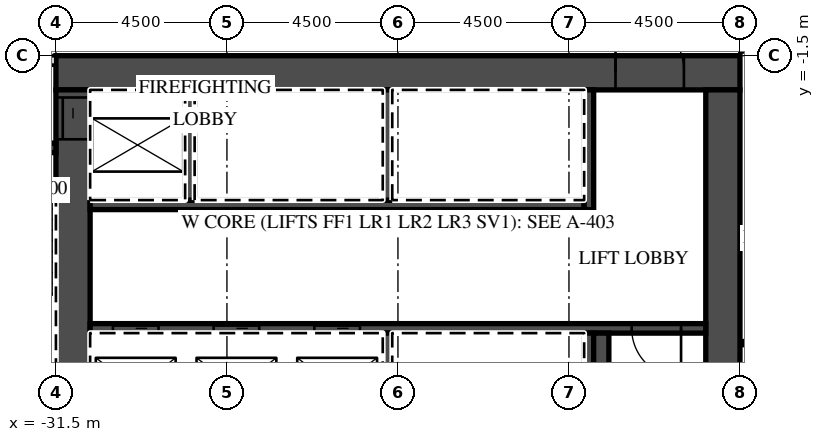
"""IFC4 building model, lengths in metres.
Left out: names, types, materials, properties, quantities, classifications, styles, units other than length and angle.
Written with IfcOpenShell. Run it as: python <this file> out.ifc"""

import sys

from ifc_helpers import new_model, si_unit, direction, frame, frame_2d, origin, place, context, subcontext, project, spatial, rectangle, extrude, element, fill, save


model = new_model("IFC4")
c1 = context("Model", 3, precision=1e-05, world=origin(), true_north=direction((0.0, 1.0)))
c2 = subcontext(c1, "Body", "Model", "MODEL_VIEW")
j1 = project(units=[si_unit("LENGTHUNIT", "METRE"), si_unit("PLANEANGLEUNIT", "RADIAN")], contexts=[c1])
p1 = place(None, origin())
s1 = spatial("IfcSite", under=j1, at=p1, CompositionType="ELEMENT")
p2 = place(p1, origin())
s2 = spatial("IfcBuilding", under=s1, at=p2, CompositionType="ELEMENT")
p3 = place(p2, frame((0.0, 0.0, 79.8)))
s3 = spatial("IfcBuildingStorey", under=s2, at=p3, CompositionType="ELEMENT", Elevation=79.8)
p4 = place(p3, frame((-13.5, -1.3, 0.0), z_axis=(0.0, 0.0, 1.0), x_axis=(1.0, 0.0, 0.0)))
e1 = element("IfcWall", 1, at=p4, inside=s3, PredefinedType="PARTITIONING", context=c2, shape_type="SweptSolid", body=[
    extrude(rectangle(XDim=58.05, YDim=0.2, at=frame_2d((29.025, 0.0))), origin(), (0.0, 0.0, 1.0), 3.02),
])
p5 = place(p4, frame((2.925, 0.0, 0.0)))
e2 = element("IfcOpeningElement", 2, at=p5, cuts=e1, PredefinedType="OPENING", context=c2, shape_type="SweptSolid", body=[
    extrude(rectangle(XDim=1.0, YDim=2.1, at=frame_2d((0.5, 1.05))), frame((0.0, 0.11, 0.0), z_axis=(0.0, -1.0, 0.0), x_axis=(1.0, 0.0, 0.0)), (0.0, 0.0, 1.0), 0.22),
])
p6 = place(p4, frame((7.45, 0.0, 0.0)))
e3 = element("IfcOpeningElement", 3, at=p6, cuts=e1, PredefinedType="OPENING", context=c2, shape_type="SweptSolid", body=[
    extrude(rectangle(XDim=1.0, YDim=2.1, at=frame_2d((0.5, 1.05))), frame((0.0, 0.11, 0.0), z_axis=(0.0, -1.0, 0.0), x_axis=(1.0, 0.0, 0.0)), (0.0, 0.0, 1.0), 0.22),
])
p7 = place(p4, frame((11.925, 0.0, 0.0)))
e4 = element("IfcOpeningElement", 4, at=p7, cuts=e1, PredefinedType="OPENING", context=c2, shape_type="SweptSolid", body=[
    extrude(rectangle(XDim=1.0, YDim=2.1, at=frame_2d((0.5, 1.05))), frame((0.0, 0.11, 0.0), z_axis=(0.0, -1.0, 0.0), x_axis=(1.0, 0.0, 0.0)), (0.0, 0.0, 1.0), 0.22),
])
p8 = place(p4, frame((15.938, 0.0, 0.0)))
e5 = element("IfcOpeningElement", 5, at=p8, cuts=e1, PredefinedType="OPENING", context=c2, shape_type="SweptSolid", body=[
    extrude(rectangle(XDim=1.2, YDim=2.1, at=frame_2d((0.6, 1.05))), frame((0.0, 0.11, 0.0), z_axis=(0.0, -1.0, 0.0), x_axis=(1.0, 0.0, 0.0)), (0.0, 0.0, 1.0), 0.22),
])
p9 = place(p4, frame((25.45, 0.0, 0.0)))
e6 = element("IfcOpeningElement", 6, at=p9, cuts=e1, PredefinedType="OPENING", context=c2, shape_type="SweptSolid", body=[
    extrude(rectangle(XDim=1.0, YDim=2.1, at=frame_2d((0.5, 1.05))), frame((0.0, 0.11, 0.0), z_axis=(0.0, -1.0, 0.0), x_axis=(1.0, 0.0, 0.0)), (0.0, 0.0, 1.0), 0.22),
])
p10 = place(p4, frame((29.925, 0.0, 0.0)))
e7 = element("IfcOpeningElement", 7, at=p10, cuts=e1, PredefinedType="OPENING", context=c2, shape_type="SweptSolid", body=[
    extrude(rectangle(XDim=1.0, YDim=2.1, at=frame_2d((0.5, 1.05))), frame((0.0, 0.11, 0.0), z_axis=(0.0, -1.0, 0.0), x_axis=(1.0, 0.0, 0.0)), (0.0, 0.0, 1.0), 0.22),
])
p11 = place(p4, frame((36.862, 0.0, 0.0)))
e8 = element("IfcOpeningElement", 8, at=p11, cuts=e1, PredefinedType="OPENING", context=c2, shape_type="SweptSolid", body=[
    extrude(rectangle(XDim=1.2, YDim=2.1, at=frame_2d((0.6, 1.05))), frame((0.0, 0.11, 0.0), z_axis=(0.0, -1.0, 0.0), x_axis=(1.0, 0.0, 0.0)), (0.0, 0.0, 1.0), 0.22),
])
p12 = place(p4, frame((41.075, 0.0, 0.0)))
e9 = element("IfcOpeningElement", 9, at=p12, cuts=e1, PredefinedType="OPENING", context=c2, shape_type="SweptSolid", body=[
    extrude(rectangle(XDim=1.0, YDim=2.1, at=frame_2d((0.5, 1.05))), frame((0.0, 0.11, 0.0), z_axis=(0.0, -1.0, 0.0), x_axis=(1.0, 0.0, 0.0)), (0.0, 0.0, 1.0), 0.22),
])
p13 = place(p4, frame((45.55, 0.0, 0.0)))
e10 = element("IfcOpeningElement", 10, at=p13, cuts=e1, PredefinedType="OPENING", context=c2, shape_type="SweptSolid", body=[
    extrude(rectangle(XDim=1.0, YDim=2.1, at=frame_2d((0.5, 1.05))), frame((0.0, 0.11, 0.0), z_axis=(0.0, -1.0, 0.0), x_axis=(1.0, 0.0, 0.0)), (0.0, 0.0, 1.0), 0.22),
])
p14 = place(p4, frame((52.425, 0.0, 0.0)))
e11 = element("IfcOpeningElement", 11, at=p14, cuts=e1, PredefinedType="OPENING", context=c2, shape_type="SweptSolid", body=[
    extrude(rectangle(XDim=1.0, YDim=2.1, at=frame_2d((0.5, 1.05))), frame((0.0, 0.11, 0.0), z_axis=(0.0, -1.0, 0.0), x_axis=(1.0, 0.0, 0.0)), (0.0, 0.0, 1.0), 0.22),
])
p15 = place(p4, frame((56.525, 0.0, 0.0)))
e12 = element("IfcOpeningElement", 12, at=p15, cuts=e1, PredefinedType="OPENING", context=c2, shape_type="SweptSolid", body=[
    extrude(rectangle(XDim=1.0, YDim=2.1, at=frame_2d((0.5, 1.05))), frame((0.0, 0.11, 0.0), z_axis=(0.0, -1.0, 0.0), x_axis=(1.0, 0.0, 0.0)), (0.0, 0.0, 1.0), 0.22),
])
p16 = place(p3, frame((-31.5, -1.95, 0.0), z_axis=(0.0, 0.0, 1.0), x_axis=(1.0, 0.0, 0.0)))
e13 = element("IfcWall", 13, at=p16, inside=s3, PredefinedType="SHEAR", context=c2, shape_type="SweptSolid", body=[
    extrude(rectangle(XDim=18.0, YDim=0.9, at=frame_2d((9.0, 0.0))), origin(), (0.0, 0.0, 1.0), 3.02),
])
p17 = place(p16, frame((14.725, 0.0, 0.0)))
e14 = element("IfcOpeningElement", 14, at=p17, cuts=e13, PredefinedType="OPENING", context=c2, shape_type="SweptSolid", body=[
    extrude(rectangle(XDim=1.8, YDim=2.1, at=frame_2d((0.9, 1.05))), frame((0.0, 0.46, 0.0), z_axis=(0.0, -1.0, 0.0), x_axis=(1.0, 0.0, 0.0)), (0.0, 0.0, 1.0), 0.92),
])
p18 = place(p3, frame((-31.05, -15.2, 0.0), z_axis=(0.0, 0.0, 1.0), x_axis=(0.0, 1.0, 0.0)))
e15 = element("IfcWall", 15, at=p18, inside=s3, PredefinedType="SHEAR", context=c2, shape_type="SweptSolid", body=[
    extrude(rectangle(XDim=12.8, YDim=0.9, at=frame_2d((6.4, 0.0))), origin(), (0.0, 0.0, 1.0), 3.02),
])
p19 = place(p18, frame((11.5, 0.0, 0.0)))
e16 = element("IfcOpeningElement", 16, at=p19, cuts=e15, PredefinedType="OPENING", context=c2, shape_type="SweptSolid", body=[
    extrude(rectangle(XDim=1.1, YDim=2.1, at=frame_2d((0.55, 1.05))), frame((0.0, 0.46, 0.0), z_axis=(0.0, -1.0, 0.0), x_axis=(1.0, 0.0, 0.0)), (0.0, 0.0, 1.0), 0.92),
])
p20 = place(p3, frame((-13.95, -14.6, 0.0), z_axis=(0.0, 0.0, 1.0), x_axis=(0.0, 1.0, 0.0)))
e17 = element("IfcWall", 17, at=p20, inside=s3, PredefinedType="SHEAR", context=c2, shape_type="SweptSolid", body=[
    extrude(rectangle(XDim=12.2, YDim=0.9, at=frame_2d((6.1, 0.0))), origin(), (0.0, 0.0, 1.0), 3.02),
])
p21 = place(p3, frame((-30.6, -5.425, 0.0), z_axis=(0.0, 0.0, 1.0), x_axis=(1.0, 0.0, 0.0)))
e18 = element("IfcWall", 18, at=p21, inside=s3, PredefinedType="SHEAR", context=c2, shape_type="SweptSolid", body=[
    extrude(rectangle(XDim=13.0, YDim=0.25, at=frame_2d((6.5, 0.0))), origin(), (0.0, 0.0, 1.0), 3.02),
])
p22 = place(p3, frame((-17.475, -5.55, 0.0), z_axis=(0.0, 0.0, 1.0), x_axis=(0.0, 1.0, 0.0)))
e19 = element("IfcWall", 19, at=p22, inside=s3, PredefinedType="SHEAR", context=c2, shape_type="SweptSolid", body=[
    extrude(rectangle(XDim=3.15, YDim=0.25, at=frame_2d((1.575, 0.0))), origin(), (0.0, 0.0, 1.0), 3.02),
])
for number, where, z_axis, x_axis in (
    (20, (-27.975, -5.3, 0.0), (0.0, 0.0, 1.0), (0.0, 1.0, 0.0)),
    (21, (-22.775, -5.3, 0.0), (0.0, 0.0, 1.0), (0.0, 1.0, 0.0)),
):
    element("IfcWall", number, at=place(p3, frame(where, z_axis=z_axis, x_axis=x_axis)), inside=s3, PredefinedType="SHEAR", context=c2, shape_type="SweptSolid", body=[
        extrude(rectangle(XDim=2.9, YDim=0.25, at=frame_2d((1.45, 0.0))), origin(), (0.0, 0.0, 1.0), 3.02),
    ])
p23 = place(p3, frame((-30.6, -8.675, 0.0), z_axis=(0.0, 0.0, 1.0), x_axis=(1.0, 0.0, 0.0)))
e22 = element("IfcWall", 22, at=p23, inside=s3, PredefinedType="SHEAR", context=c2, shape_type="SweptSolid", body=[
    extrude(rectangle(XDim=16.2, YDim=0.25, at=frame_2d((8.1, 0.0))), origin(), (0.0, 0.0, 1.0), 3.02),
])
p24 = place(p23, frame((0.6, 0.0, 0.0)))
e23 = element("IfcOpeningElement", 23, at=p24, cuts=e22, PredefinedType="OPENING", context=c2, shape_type="SweptSolid", body=[
    extrude(rectangle(XDim=1.2, YDim=2.1, at=frame_2d((0.6, 1.05))), frame((0.0, 0.135, 0.0), z_axis=(0.0, -1.0, 0.0), x_axis=(1.0, 0.0, 0.0)), (0.0, 0.0, 1.0), 0.27),
])
p25 = place(p23, frame((3.25, 0.0, 0.0)))
e24 = element("IfcOpeningElement", 24, at=p25, cuts=e22, PredefinedType="OPENING", context=c2, shape_type="SweptSolid", body=[
    extrude(rectangle(XDim=1.2, YDim=2.1, at=frame_2d((0.6, 1.05))), frame((0.0, 0.135, 0.0), z_axis=(0.0, -1.0, 0.0), x_axis=(1.0, 0.0, 0.0)), (0.0, 0.0, 1.0), 0.27),
])
p26 = place(p23, frame((5.9, 0.0, 0.0)))
e25 = element("IfcOpeningElement", 25, at=p26, cuts=e22, PredefinedType="OPENING", context=c2, shape_type="SweptSolid", body=[
    extrude(rectangle(XDim=1.2, YDim=2.1, at=frame_2d((0.6, 1.05))), frame((0.0, 0.135, 0.0), z_axis=(0.0, -1.0, 0.0), x_axis=(1.0, 0.0, 0.0)), (0.0, 0.0, 1.0), 0.27),
])
p27 = place(p23, frame((14.25, 0.0, 0.0)))
e26 = element("IfcOpeningElement", 26, at=p27, cuts=e22, PredefinedType="OPENING", context=c2, shape_type="SweptSolid", body=[
    extrude(rectangle(XDim=1.3, YDim=2.1, at=frame_2d((0.65, 1.05))), frame((0.0, 0.135, 0.0), z_axis=(0.0, -1.0, 0.0), x_axis=(1.0, 0.0, 0.0)), (0.0, 0.0, 1.0), 0.27),
])
for number, where, z_axis, x_axis in (
    (27, (-17.475, -11.7, 0.0), (0.0, 0.0, 1.0), (0.0, 1.0, 0.0)),
    (28, (-22.775, -11.7, 0.0), (0.0, 0.0, 1.0), (0.0, 1.0, 0.0)),
):
    element("IfcWall", number, at=place(p3, frame(where, z_axis=z_axis, x_axis=x_axis)), inside=s3, PredefinedType="SHEAR", context=c2, shape_type="SweptSolid", body=[
        extrude(rectangle(XDim=2.9, YDim=0.25, at=frame_2d((1.45, 0.0))), origin(), (0.0, 0.0, 1.0), 3.02),
    ])
p28 = place(p3, frame((-17.15, -14.6, 0.0), z_axis=(0.0, 0.0, 1.0), x_axis=(0.0, 1.0, 0.0)))
e29 = element("IfcWall", 29, at=p28, inside=s3, PredefinedType="SHEAR", context=c2, shape_type="SweptSolid", body=[
    extrude(rectangle(XDim=5.8, YDim=0.4, at=frame_2d((2.9, 0.0))), origin(), (0.0, 0.0, 1.0), 3.02),
])
p29 = place(p3, frame((-44.55, -1.625, 0.0), z_axis=(0.0, 0.0, 1.0), x_axis=(1.0, 0.0, 0.0)))
e30 = element("IfcWall", 30, at=p29, inside=s3, PredefinedType="PARTITIONING", context=c2, shape_type="SweptSolid", body=[
    extrude(rectangle(XDim=13.05, YDim=0.25, at=frame_2d((6.525, 0.0))), origin(), (0.0, 0.0, 1.0), 3.02),
])
p30 = place(p29, frame((11.125, 0.0, 0.0)))
e31 = element("IfcOpeningElement", 31, at=p30, cuts=e30, PredefinedType="OPENING", context=c2, shape_type="SweptSolid", body=[
    extrude(rectangle(XDim=1.3, YDim=2.1, at=frame_2d((0.65, 1.05))), frame((0.0, 0.135, 0.0), z_axis=(0.0, -1.0, 0.0), x_axis=(1.0, 0.0, 0.0)), (0.0, 0.0, 1.0), 0.27),
])
p31 = place(p29, frame((8.7, 0.0, 0.0)))
e32 = element("IfcOpeningElement", 32, at=p31, cuts=e30, PredefinedType="OPENING", context=c2, shape_type="SweptSolid", body=[
    extrude(rectangle(XDim=1.1, YDim=2.1, at=frame_2d((0.55, 1.05))), frame((0.0, 0.135, 0.0), z_axis=(0.0, -1.0, 0.0), x_axis=(1.0, 0.0, 0.0)), (0.0, 0.0, 1.0), 0.27),
])
p32 = place(p3, frame((-34.05, -3.925, 0.0), z_axis=(0.0, 0.0, 1.0), x_axis=(1.0, 0.0, 0.0)))
e33 = element("IfcWall", 33, at=p32, inside=s3, PredefinedType="SHEAR", context=c2, shape_type="SweptSolid", body=[
    extrude(rectangle(XDim=2.55, YDim=0.25, at=frame_2d((1.275, 0.0))), origin(), (0.0, 0.0, 1.0), 3.02),
])
p33 = place(p32, frame((0.625, 0.0, 0.0)))
e34 = element("IfcOpeningElement", 34, at=p33, cuts=e33, PredefinedType="OPENING", context=c2, shape_type="SweptSolid", body=[
    extrude(rectangle(XDim=1.3, YDim=2.1, at=frame_2d((0.65, 1.05))), frame((0.0, 0.135, 0.0), z_axis=(0.0, -1.0, 0.0), x_axis=(1.0, 0.0, 0.0)), (0.0, 0.0, 1.0), 0.27),
])
p34 = place(p24, origin())
e35 = element("IfcDoor", 35, at=p34, inside=s3, OperationType="SLIDING_TO_LEFT", PredefinedType="DOOR", context=c2, shape_type="SweptSolid", body=[
    extrude(rectangle(XDim=1.2, YDim=2.1, at=frame_2d((0.6, 1.05))), frame((0.0, 0.025, 0.0), z_axis=(0.0, -1.0, 0.0), x_axis=(1.0, 0.0, 0.0)), (0.0, 0.0, 1.0), 0.05),
])
fill(e23, e35)
p35 = place(p25, origin())
e36 = element("IfcDoor", 36, at=p35, inside=s3, OperationType="SLIDING_TO_RIGHT", PredefinedType="DOOR", context=c2, shape_type="SweptSolid", body=[
    extrude(rectangle(XDim=1.2, YDim=2.1, at=frame_2d((0.6, 1.05))), frame((0.0, 0.025, 0.0), z_axis=(0.0, -1.0, 0.0), x_axis=(1.0, 0.0, 0.0)), (0.0, 0.0, 1.0), 0.05),
])
fill(e24, e36)
p36 = place(p26, origin())
e37 = element("IfcDoor", 37, at=p36, inside=s3, OperationType="SLIDING_TO_RIGHT", PredefinedType="DOOR", context=c2, shape_type="SweptSolid", body=[
    extrude(rectangle(XDim=1.2, YDim=2.1, at=frame_2d((0.6, 1.05))), frame((0.0, 0.025, 0.0), z_axis=(0.0, -1.0, 0.0), x_axis=(1.0, 0.0, 0.0)), (0.0, 0.0, 1.0), 0.05),
])
fill(e25, e37)
p37 = place(p19, origin())
e38 = element("IfcDoor", 38, at=p37, inside=s3, OperationType="SLIDING_TO_RIGHT", PredefinedType="DOOR", context=c2, shape_type="SweptSolid", body=[
    extrude(rectangle(XDim=1.1, YDim=2.1, at=frame_2d((0.55, 1.05))), frame((0.0, 0.025, 0.0), z_axis=(0.0, -1.0, 0.0), x_axis=(1.0, 0.0, 0.0)), (0.0, 0.0, 1.0), 0.05),
])
fill(e16, e38)
p38 = place(p17, origin())
e39 = element("IfcDoor", 39, at=p38, inside=s3, OperationType="DOUBLE_DOOR_DOUBLE_SWING", PredefinedType="DOOR", context=c2, shape_type="SweptSolid", body=[
    extrude(rectangle(XDim=1.8, YDim=2.1, at=frame_2d((0.9, 1.05))), frame((0.0, 0.025, 0.0), z_axis=(0.0, -1.0, 0.0), x_axis=(1.0, 0.0, 0.0)), (0.0, 0.0, 1.0), 0.05),
])
fill(e14, e39)
p39 = place(p27, origin())
e40 = element("IfcDoor", 40, at=p39, inside=s3, OperationType="SINGLE_SWING_RIGHT", PredefinedType="DOOR", context=c2, shape_type="SweptSolid", body=[
    extrude(rectangle(XDim=1.3, YDim=2.1, at=frame_2d((0.65, 1.05))), frame((0.0, 0.025, 0.0), z_axis=(0.0, -1.0, 0.0), x_axis=(1.0, 0.0, 0.0)), (0.0, 0.0, 1.0), 0.05),
])
fill(e26, e40)
save(model, sys.argv[1])
